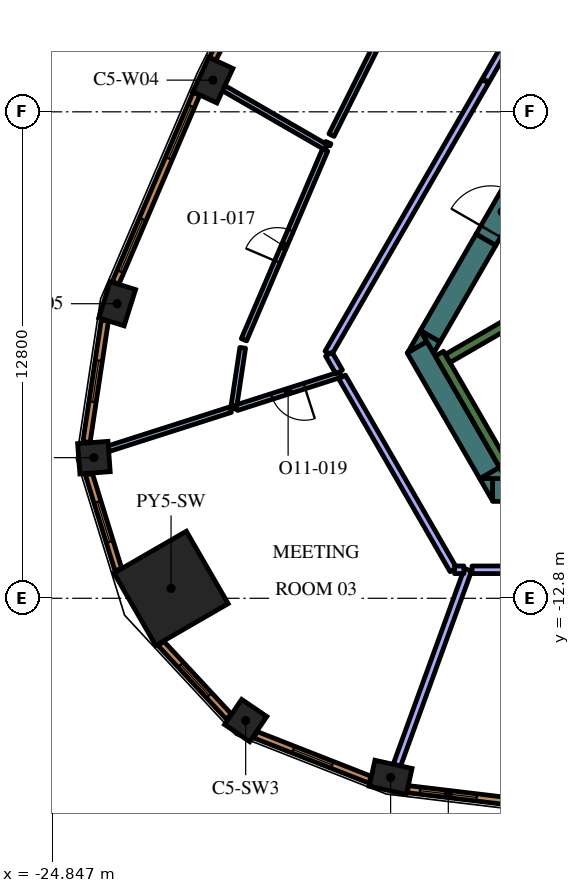
"""IFC4 building model, lengths in metres.
Left out: names, types, materials, properties, quantities, classifications, styles, units other than length and angle.
Written with IfcOpenShell. Run it as: python <this file> out.ifc"""

import sys

from ifc_helpers import new_model, si_unit, direction, frame, frame_2d, origin, origin_2d, place, context, subcontext, project, spatial, polyline, rectangle, outline, extrude, element, fill, save


model = new_model("IFC4")
c1 = context("Model", 3, precision=1e-05, world=origin(), true_north=direction((0.0, 1.0)))
c2 = subcontext(c1, "Body", "Model", "MODEL_VIEW")
j1 = project(units=[si_unit("LENGTHUNIT", "METRE"), si_unit("PLANEANGLEUNIT", "RADIAN")], contexts=[c1])
p1 = place(None, origin())
s1 = spatial("IfcSite", under=j1, at=p1, CompositionType="ELEMENT")
p2 = place(p1, origin())
s2 = spatial("IfcBuilding", under=s1, at=p2, CompositionType="ELEMENT")
p3 = place(p2, frame((0.0, 0.0, 271.2)))
s3 = spatial("IfcBuildingStorey", under=s2, at=p3, CompositionType="ELEMENT", Elevation=271.2)
p4 = place(p3, frame((-21.718, -12.539, 0.0), z_axis=(0.0, 0.0, 1.0), x_axis=(-0.866025403784, -0.5, 0.0)))
e1 = element("IfcColumn", 1, at=p4, inside=s3, PredefinedType="COLUMN", context=c2, shape_type="SweptSolid", body=[
    extrude(rectangle(XDim=2.2, YDim=2.2, at=origin_2d()), origin(), (0.0, 0.0, 1.0), 4.2),
])
for number, where, z_axis, x_axis in (
    (2, (-15.941, -17.512, 0.0), (0.0, 0.0, 1.0), (0.976, -0.217, 0.0)),
    (3, (-20.619, 0.834, 0.0), (0.0, 0.0, 1.0), (-0.421, -0.907, 0.0)),
    (4, (-23.136, -5.049, 0.0), (0.0, 0.0, 1.0), (-0.3, -0.954, 0.0)),
):
    element("IfcColumn", number, at=place(p3, frame(where, z_axis=z_axis, x_axis=x_axis)), inside=s3, PredefinedType="COLUMN", context=c2, shape_type="SweptSolid", body=[
        extrude(rectangle(XDim=1.0, YDim=0.7, at=origin_2d()), origin(), (0.0, 0.0, 1.0), 4.2),
    ])
for number, where, z_axis, x_axis in (
    (5, (-23.748, -9.1, 0.0), (0.0, 0.0, 1.0), (0.075, -0.997, 0.0)),
    (6, (-19.754, -16.017, 0.0), (0.0, 0.0, 1.0), (0.826, -0.563, 0.0)),
):
    element("IfcColumn", number, at=place(p3, frame(where, z_axis=z_axis, x_axis=x_axis)), inside=s3, PredefinedType="COLUMN", context=c2, shape_type="SweptSolid", body=[
        extrude(rectangle(XDim=0.8, YDim=0.8, at=origin_2d()), origin(), (0.0, 0.0, 1.0), 4.2),
    ])
p5 = place(p3, frame((8.904, -9.95, 0.0), z_axis=(0.0, 0.0, 1.0), x_axis=(-1.0, 0.0, 0.0)))
e7 = element("IfcWall", 7, at=p5, inside=s3, PredefinedType="SOLIDWALL", context=c2, shape_type="SweptSolid", body=[
    extrude(rectangle(XDim=22.161, YDim=0.6, at=frame_2d((11.081, 0.0))), origin(), (0.0, 0.0, 1.0), 4.2),
])
p6 = place(p3, origin())
e8 = element("IfcWall", 8, at=p6, inside=s3, PredefinedType="SOLIDWALL", context=c2, shape_type="SweptSolid", body=[
    extrude(outline(polyline([(-13.597, -9.65), (-13.259, -9.65), (-13.259, -10.236), (-13.597, -9.65)])), origin(), (0.0, 0.0, 1.0), 4.2),
])
p7 = place(p3, frame((-13.333, -9.506, 0.0), z_axis=(0.0, 0.0, 1.0), x_axis=(-0.500019073792, 0.866014391245, 0.0)))
e9 = element("IfcWall", 9, at=p7, inside=s3, PredefinedType="SOLIDWALL", context=c2, shape_type="SweptSolid", body=[
    extrude(rectangle(XDim=3.823, YDim=0.6, at=frame_2d((1.912, 0.0))), origin(), (0.0, 0.0, 1.0), 4.2),
])
e10 = element("IfcWall", 10, at=p6, inside=s3, PredefinedType="SOLIDWALL", context=c2, shape_type="SweptSolid", body=[
    extrude(outline(polyline([(-14.987, -6.043), (-15.493, -6.335), (-15.156, -5.75), (-14.987, -6.043)])), origin(), (0.0, 0.0, 1.0), 4.2),
])
e11 = element("IfcWall", 11, at=p6, inside=s3, PredefinedType="SOLIDWALL", context=c2, shape_type="SweptSolid", body=[
    extrude(outline(polyline([(-12.904, -9.65), (-13.58, -9.65), (-13.073, -9.357), (-12.904, -9.65)])), origin(), (0.0, 0.0, 1.0), 4.2),
])
p8 = place(p3, frame((-13.432, -3.364, 0.0), z_axis=(0.0, 0.0, 1.0), x_axis=(-0.499960127962, -0.866048422692, 0.0)))
e12 = element("IfcWall", 12, at=p8, inside=s3, PredefinedType="SOLIDWALL", context=c2, shape_type="SweptSolid", body=[
    extrude(rectangle(XDim=2.934, YDim=0.6, at=frame_2d((1.467, 0.0))), origin(), (0.0, 0.0, 1.0), 4.2),
])
e13 = element("IfcWall", 13, at=p6, inside=s3, PredefinedType="SOLIDWALL", context=c2, shape_type="SweptSolid", body=[
    extrude(outline(polyline([(-14.809, -6.35), (-15.147, -5.764), (-14.64, -6.057), (-14.809, -6.35)])), origin(), (0.0, 0.0, 1.0), 4.2),
])
p9 = place(p3, frame((-12.84, -9.511, 0.0), z_axis=(0.0, 0.0, 1.0), x_axis=(-0.499997733992, 0.866026712061, 0.0)))
e14 = element("IfcWall", 14, at=p9, inside=s3, PredefinedType="SOLIDWALL", context=c2, shape_type="SweptSolid", body=[
    extrude(rectangle(XDim=3.634, YDim=0.25, at=frame_2d((1.817, 0.0))), origin(), (0.0, 0.0, 1.0), 4.2),
])
p10 = place(p3, frame((-14.44, -6.49, 0.0), z_axis=(0.0, 0.0, 1.0), x_axis=(0.866022966069, 0.500004222222, 0.0)))
e15 = element("IfcWall", 15, at=p10, inside=s3, PredefinedType="SOLIDWALL", context=c2, shape_type="SweptSolid", body=[
    extrude(rectangle(XDim=6.8, YDim=0.25, at=frame_2d((3.4, 0.0))), origin(), (0.0, 0.0, 1.0), 4.2),
])
p11 = place(p3, frame((-13.432, -3.364, 0.0), z_axis=(0.0, 0.0, 1.0), x_axis=(0.500000056704, 0.866025371046, 0.0)))
e16 = element("IfcWall", 16, at=p11, inside=s3, PredefinedType="SOLIDWALL", context=c2, shape_type="SweptSolid", body=[
    extrude(rectangle(XDim=1.7, YDim=0.6, at=frame_2d((0.85, 0.0))), origin(), (0.0, 0.0, 1.0), 4.2),
])
p12 = place(p11, frame((0.25, 0.0, 0.0)))
e17 = element("IfcOpeningElement", 17, at=p12, cuts=e16, PredefinedType="OPENING", context=c2, shape_type="SweptSolid", body=[
    extrude(rectangle(XDim=1.2, YDim=2.1, at=frame_2d((0.6, 1.05))), frame((0.0, 0.31, 0.0), z_axis=(0.0, -1.0, 0.0), x_axis=(1.0, 0.0, 0.0)), (0.0, 0.0, 1.0), 0.62),
])
p13 = place(p3, frame((-15.774, -17.19, 0.0), z_axis=(0.0, 0.0, 1.0), x_axis=(0.341821907823, 0.93976474893, 0.0)))
e18 = element("IfcWall", 18, at=p13, inside=s3, PredefinedType="PARTITIONING", context=c2, shape_type="SweptSolid", body=[
    extrude(rectangle(XDim=5.469, YDim=0.2, at=frame_2d((2.735, 0.0))), origin(), (0.0, 0.0, 1.0), 3.55),
])
p14 = place(p3, frame((-13.799, -12.05, 0.0), z_axis=(0.0, 0.0, 1.0), x_axis=(1.0, 0.0, 0.0)))
e19 = element("IfcWall", 19, at=p14, inside=s3, PredefinedType="PARTITIONING", context=c2, shape_type="SweptSolid", body=[
    extrude(rectangle(XDim=7.769, YDim=0.2, at=frame_2d((3.884, 0.0))), origin(), (0.0, 0.0, 1.0), 3.55),
])
p15 = place(p3, frame((-17.635, -0.936, 0.0), z_axis=(0.0, 0.0, 1.0), x_axis=(-0.866044607523, 0.499966736674, 0.0)))
e20 = element("IfcWall", 20, at=p15, inside=s3, PredefinedType="PARTITIONING", context=c2, shape_type="SweptSolid", body=[
    extrude(rectangle(XDim=3.115, YDim=0.15, at=frame_2d((1.557, 0.0))), origin(), (0.0, 0.0, 1.0), 3.55),
])
p16 = place(p3, frame((-17.497, -0.613, 0.0), z_axis=(0.0, 0.0, 1.0), x_axis=(0.447474899467, 0.894296491297, 0.0)))
e21 = element("IfcWall", 21, at=p16, inside=s3, PredefinedType="PARTITIONING", context=c2, shape_type="SweptSolid", body=[
    extrude(rectangle(XDim=5.979, YDim=0.15, at=frame_2d((2.99, 0.0))), origin(), (0.0, 0.0, 1.0), 3.55),
])
p17 = place(p16, frame((2.58, 0.0, 0.0)))
e22 = element("IfcOpeningElement", 22, at=p17, cuts=e21, PredefinedType="OPENING", context=c2, shape_type="SweptSolid", body=[
    extrude(rectangle(XDim=0.9, YDim=2.1, at=frame_2d((0.45, 1.05))), frame((0.0, 0.085, 0.0), z_axis=(0.0, -1.0, 0.0), x_axis=(1.0, 0.0, 0.0)), (0.0, 0.0, 1.0), 0.17),
])
p18 = place(p3, frame((-17.581, -0.81, 0.0), z_axis=(0.0, 0.0, 1.0), x_axis=(-0.390033474923, -0.92080067791, 0.0)))
e23 = element("IfcWall", 23, at=p18, inside=s3, PredefinedType="PARTITIONING", context=c2, shape_type="SweptSolid", body=[
    extrude(rectangle(XDim=0.061, YDim=0.15, at=frame_2d((0.03, 0.0))), origin(), (0.0, 0.0, 1.0), 3.55),
])
p19 = place(p3, frame((-19.8, -5.998, 0.0), z_axis=(0.0, 0.0, 1.0), x_axis=(0.39332238233, 0.919400621904, 0.0)))
e24 = element("IfcWall", 24, at=p19, inside=s3, PredefinedType="PARTITIONING", context=c2, shape_type="SweptSolid", body=[
    extrude(rectangle(XDim=5.431, YDim=0.15, at=frame_2d((2.715, 0.0))), origin(), (0.0, 0.0, 1.0), 3.55),
])
p20 = place(p19, frame((2.231, 0.0, 0.0)))
e25 = element("IfcOpeningElement", 25, at=p20, cuts=e24, PredefinedType="OPENING", context=c2, shape_type="SweptSolid", body=[
    extrude(rectangle(XDim=0.9, YDim=2.1, at=frame_2d((0.45, 1.05))), frame((0.0, 0.085, 0.0), z_axis=(0.0, -1.0, 0.0), x_axis=(1.0, 0.0, 0.0)), (0.0, 0.0, 1.0), 0.17),
])
p21 = place(p3, frame((-19.833, -6.21, 0.0), z_axis=(0.0, 0.0, 1.0), x_axis=(-0.149305499664, -0.988791114326, 0.0)))
e26 = element("IfcWall", 26, at=p21, inside=s3, PredefinedType="PARTITIONING", context=c2, shape_type="SweptSolid", body=[
    extrude(rectangle(XDim=1.62, YDim=0.15, at=frame_2d((0.81, 0.0))), origin(), (0.0, 0.0, 1.0), 3.55),
])
p22 = place(p3, frame((-20.154, -7.838, 0.0), z_axis=(0.0, 0.0, 1.0), x_axis=(-0.952501497002, -0.304533903217, 0.0)))
e27 = element("IfcWall", 27, at=p22, inside=s3, PredefinedType="PARTITIONING", context=c2, shape_type="SweptSolid", body=[
    extrude(rectangle(XDim=3.37, YDim=0.15, at=frame_2d((1.685, 0.0))), origin(), (0.0, 0.0, 1.0), 3.55),
])
p23 = place(p3, frame((-17.256, -6.911, 0.0), z_axis=(0.0, 0.0, 1.0), x_axis=(-0.95247639241, -0.304612412587, 0.0)))
e28 = element("IfcWall", 28, at=p23, inside=s3, PredefinedType="PARTITIONING", context=c2, shape_type="SweptSolid", body=[
    extrude(rectangle(XDim=2.875, YDim=0.15, at=frame_2d((1.438, 0.0))), origin(), (0.0, 0.0, 1.0), 3.55),
])
p24 = place(p23, frame((1.0, 0.0, 0.0)))
e29 = element("IfcOpeningElement", 29, at=p24, cuts=e28, PredefinedType="OPENING", context=c2, shape_type="SweptSolid", body=[
    extrude(rectangle(XDim=0.9, YDim=2.1, at=frame_2d((0.45, 1.05))), frame((0.0, 0.085, 0.0), z_axis=(0.0, -1.0, 0.0), x_axis=(1.0, 0.0, 0.0)), (0.0, 0.0, 1.0), 0.17),
])
p25 = place(p3, frame((-7.436, 11.221, 0.0), z_axis=(0.0, 0.0, 1.0), x_axis=(-0.49999894854, -0.866026010844, 0.0)))
e30 = element("IfcWall", 30, at=p25, inside=s3, PredefinedType="PARTITIONING", context=c2, shape_type="SweptSolid", body=[
    extrude(rectangle(XDim=12.0, YDim=0.2, at=frame_2d((6.0, 0.0))), origin(), (0.0, 0.0, 1.0), 3.55),
])
p26 = place(p25, frame((5.5, 0.0, 0.0)))
e31 = element("IfcOpeningElement", 31, at=p26, cuts=e30, PredefinedType="OPENING", context=c2, shape_type="SweptSolid", body=[
    extrude(rectangle(XDim=1.0, YDim=2.1, at=frame_2d((0.5, 1.05))), frame((0.0, 0.11, 0.0), z_axis=(0.0, -1.0, 0.0), x_axis=(1.0, 0.0, 0.0)), (0.0, 0.0, 1.0), 0.22),
])
p27 = place(p3, frame((-13.451, 0.803, 0.0), z_axis=(0.0, 0.0, 1.0), x_axis=(-0.499982585408, -0.86603545787, 0.0)))
e32 = element("IfcWall", 32, at=p27, inside=s3, PredefinedType="PARTITIONING", context=c2, shape_type="SweptSolid", body=[
    extrude(rectangle(XDim=8.26, YDim=0.2, at=frame_2d((4.13, 0.0))), origin(), (0.0, 0.0, 1.0), 3.55),
])
p28 = place(p3, frame((-17.565, -6.376, 0.0), z_axis=(0.0, 0.0, 1.0), x_axis=(0.499683376352, -0.866208129376, 0.0)))
e33 = element("IfcWall", 33, at=p28, inside=s3, PredefinedType="PARTITIONING", context=c2, shape_type="SweptSolid", body=[
    extrude(rectangle(XDim=0.541, YDim=0.2, at=frame_2d((0.271, 0.0))), origin(), (0.0, 0.0, 1.0), 3.55),
])
p29 = place(p3, frame((-17.218, -6.978, 0.0), z_axis=(0.0, 0.0, 1.0), x_axis=(0.500012299885, -0.866018302326, 0.0)))
e34 = element("IfcWall", 34, at=p29, inside=s3, PredefinedType="PARTITIONING", context=c2, shape_type="SweptSolid", body=[
    extrude(rectangle(XDim=5.857, YDim=0.2, at=frame_2d((2.929, 0.0))), origin(), (0.0, 0.0, 1.0), 3.55),
])
p30 = place(p3, frame((-14.26, -12.05, 0.0), z_axis=(0.0, 0.0, 1.0), x_axis=(1.0, 0.0, 0.0)))
e35 = element("IfcWall", 35, at=p30, inside=s3, PredefinedType="PARTITIONING", context=c2, shape_type="SweptSolid", body=[
    extrude(rectangle(XDim=0.248, YDim=0.2, at=frame_2d((0.124, 0.0))), origin(), (0.0, 0.0, 1.0), 3.55),
])
p31 = place(p3, frame((-15.487, -17.823, 0.0), z_axis=(0.0, 0.0, 1.0), x_axis=(0.992885582795, -0.119072328769, 0.0)))
e36 = element("IfcWall", 36, at=p31, inside=s3, PredefinedType="SOLIDWALL", context=c2, shape_type="SweptSolid", body=[
    extrude(rectangle(XDim=5.415, YDim=0.19, at=frame_2d((2.708, 0.0))), origin(), (0.0, 0.0, 1.0), 3.95),
])
p32 = place(p31, frame((0.323, 0.0, 0.6)))
e37 = element("IfcOpeningElement", 37, at=p32, cuts=e36, PredefinedType="OPENING", context=c2, shape_type="SweptSolid", body=[
    extrude(rectangle(XDim=1.5, YDim=2.85, at=frame_2d((0.75, 1.425))), frame((0.0, 0.105, 0.0), z_axis=(0.0, -1.0, 0.0), x_axis=(1.0, 0.0, 0.0)), (0.0, 0.0, 1.0), 0.21),
])
p33 = place(p31, frame((3.558, 0.0, 0.6)))
e38 = element("IfcOpeningElement", 38, at=p33, cuts=e36, PredefinedType="OPENING", context=c2, shape_type="SweptSolid", body=[
    extrude(rectangle(XDim=1.5, YDim=2.85, at=frame_2d((0.75, 1.425))), frame((0.0, 0.105, 0.0), z_axis=(0.0, -1.0, 0.0), x_axis=(1.0, 0.0, 0.0)), (0.0, 0.0, 1.0), 0.21),
])
p34 = place(p3, frame((-18.206, 6.227, 0.0), z_axis=(0.0, 0.0, 1.0), x_axis=(-0.447484531401, -0.894291671747, 0.0)))
e39 = element("IfcWall", 39, at=p34, inside=s3, PredefinedType="SOLIDWALL", context=c2, shape_type="SweptSolid", body=[
    extrude(rectangle(XDim=5.406, YDim=0.19, at=frame_2d((2.703, 0.0))), origin(), (0.0, 0.0, 1.0), 3.95),
])
p35 = place(p34, frame((0.346, 0.0, 0.6)))
e40 = element("IfcOpeningElement", 40, at=p35, cuts=e39, PredefinedType="OPENING", context=c2, shape_type="SweptSolid", body=[
    extrude(rectangle(XDim=1.5, YDim=2.85, at=frame_2d((0.75, 1.425))), frame((0.0, 0.105, 0.0), z_axis=(0.0, -1.0, 0.0), x_axis=(1.0, 0.0, 0.0)), (0.0, 0.0, 1.0), 0.21),
])
p36 = place(p34, frame((3.559, 0.0, 0.6)))
e41 = element("IfcOpeningElement", 41, at=p36, cuts=e39, PredefinedType="OPENING", context=c2, shape_type="SweptSolid", body=[
    extrude(rectangle(XDim=1.5, YDim=2.85, at=frame_2d((0.75, 1.425))), frame((0.0, 0.105, 0.0), z_axis=(0.0, -1.0, 0.0), x_axis=(1.0, 0.0, 0.0)), (0.0, 0.0, 1.0), 0.21),
])
p37 = place(p3, frame((-21.049, 0.478, 0.0), z_axis=(0.0, 0.0, 1.0), x_axis=(-0.393347848476, -0.919389726992, 0.0)))
e42 = element("IfcWall", 42, at=p37, inside=s3, PredefinedType="SOLIDWALL", context=c2, shape_type="SweptSolid", body=[
    extrude(rectangle(XDim=5.415, YDim=0.19, at=frame_2d((2.708, 0.0))), origin(), (0.0, 0.0, 1.0), 3.95),
])
p38 = place(p37, frame((0.357, 0.0, 0.6)))
e43 = element("IfcOpeningElement", 43, at=p38, cuts=e42, PredefinedType="OPENING", context=c2, shape_type="SweptSolid", body=[
    extrude(rectangle(XDim=1.5, YDim=2.85, at=frame_2d((0.75, 1.425))), frame((0.0, 0.105, 0.0), z_axis=(0.0, -1.0, 0.0), x_axis=(1.0, 0.0, 0.0)), (0.0, 0.0, 1.0), 0.21),
])
p39 = place(p37, frame((3.593, 0.0, 0.6)))
e44 = element("IfcOpeningElement", 44, at=p39, cuts=e42, PredefinedType="OPENING", context=c2, shape_type="SweptSolid", body=[
    extrude(rectangle(XDim=1.5, YDim=2.85, at=frame_2d((0.75, 1.425))), frame((0.0, 0.105, 0.0), z_axis=(0.0, -1.0, 0.0), x_axis=(1.0, 0.0, 0.0)), (0.0, 0.0, 1.0), 0.21),
])
p40 = place(p3, frame((-23.46, -5.488, 0.0), z_axis=(0.0, 0.0, 1.0), x_axis=(-0.149421055602, -0.988773658702, 0.0)))
e45 = element("IfcWall", 45, at=p40, inside=s3, PredefinedType="SOLIDWALL", context=c2, shape_type="SweptSolid", body=[
    extrude(rectangle(XDim=3.237, YDim=0.19, at=frame_2d((1.618, 0.0))), origin(), (0.0, 0.0, 1.0), 3.95),
])
p41 = place(p40, frame((1.068, 0.0, 0.6)))
e46 = element("IfcOpeningElement", 46, at=p41, cuts=e45, PredefinedType="OPENING", context=c2, shape_type="SweptSolid", body=[
    extrude(rectangle(XDim=1.1, YDim=2.85, at=frame_2d((0.55, 1.425))), frame((0.0, 0.105, 0.0), z_axis=(0.0, -1.0, 0.0), x_axis=(1.0, 0.0, 0.0)), (0.0, 0.0, 1.0), 0.21),
])
p42 = place(p3, frame((-23.881, -9.535, 0.0), z_axis=(0.0, 0.0, 1.0), x_axis=(0.294706210429, -0.9555879078, 0.0)))
e47 = element("IfcWall", 47, at=p42, inside=s3, PredefinedType="SOLIDWALL", context=c2, shape_type="SweptSolid", body=[
    extrude(rectangle(XDim=2.627, YDim=0.19, at=frame_2d((1.313, 0.0))), origin(), (0.0, 0.0, 1.0), 3.95),
])
p43 = place(p42, frame((0.763, 0.0, 0.6)))
e48 = element("IfcOpeningElement", 48, at=p43, cuts=e47, PredefinedType="OPENING", context=c2, shape_type="SweptSolid", body=[
    extrude(rectangle(XDim=1.1, YDim=2.85, at=frame_2d((0.55, 1.425))), frame((0.0, 0.105, 0.0), z_axis=(0.0, -1.0, 0.0), x_axis=(1.0, 0.0, 0.0)), (0.0, 0.0, 1.0), 0.21),
])
p44 = place(p3, frame((-21.985, -13.988, 0.0), z_axis=(0.0, 0.0, 1.0), x_axis=(0.680219354823, -0.733008614768, 0.0)))
e49 = element("IfcWall", 49, at=p44, inside=s3, PredefinedType="SOLIDWALL", context=c2, shape_type="SweptSolid", body=[
    extrude(rectangle(XDim=2.627, YDim=0.19, at=frame_2d((1.313, 0.0))), origin(), (0.0, 0.0, 1.0), 3.95),
])
p45 = place(p44, frame((0.763, 0.0, 0.6)))
e50 = element("IfcOpeningElement", 50, at=p45, cuts=e49, PredefinedType="OPENING", context=c2, shape_type="SweptSolid", body=[
    extrude(rectangle(XDim=1.1, YDim=2.85, at=frame_2d((0.55, 1.425))), frame((0.0, 0.105, 0.0), z_axis=(0.0, -1.0, 0.0), x_axis=(1.0, 0.0, 0.0)), (0.0, 0.0, 1.0), 0.21),
])
p46 = place(p3, frame((-19.496, -16.392, 0.0), z_axis=(0.0, 0.0, 1.0), x_axis=(0.93100888477, -0.364996515709, 0.0)))
e51 = element("IfcWall", 51, at=p46, inside=s3, PredefinedType="SOLIDWALL", context=c2, shape_type="SweptSolid", body=[
    extrude(rectangle(XDim=3.237, YDim=0.19, at=frame_2d((1.618, 0.0))), origin(), (0.0, 0.0, 1.0), 3.95),
])
p47 = place(p46, frame((1.068, 0.0, 0.6)))
e52 = element("IfcOpeningElement", 52, at=p47, cuts=e51, PredefinedType="OPENING", context=c2, shape_type="SweptSolid", body=[
    extrude(rectangle(XDim=1.1, YDim=2.85, at=frame_2d((0.55, 1.425))), frame((0.0, 0.105, 0.0), z_axis=(0.0, -1.0, 0.0), x_axis=(1.0, 0.0, 0.0)), (0.0, 0.0, 1.0), 0.21),
])
p48 = place(p12, origin())
e53 = element("IfcDoor", 53, at=p48, inside=s3, OperationType="SINGLE_SWING_LEFT", PredefinedType="DOOR", context=c2, shape_type="SweptSolid", body=[
    extrude(rectangle(XDim=1.2, YDim=2.1, at=frame_2d((0.6, 1.05))), frame((0.0, 0.025, 0.0), z_axis=(0.0, -1.0, 0.0), x_axis=(1.0, 0.0, 0.0)), (0.0, 0.0, 1.0), 0.05),
])
fill(e17, e53)
p49 = place(p20, origin())
e54 = element("IfcDoor", 54, at=p49, inside=s3, OperationType="SINGLE_SWING_LEFT", PredefinedType="DOOR", context=c2, shape_type="SweptSolid", body=[
    extrude(rectangle(XDim=0.9, YDim=2.1, at=frame_2d((0.45, 1.05))), frame((0.0, 0.025, 0.0), z_axis=(0.0, -1.0, 0.0), x_axis=(1.0, 0.0, 0.0)), (0.0, 0.0, 1.0), 0.05),
])
fill(e25, e54)
p50 = place(p24, origin())
e55 = element("IfcDoor", 55, at=p50, inside=s3, OperationType="SINGLE_SWING_RIGHT", PredefinedType="DOOR", context=c2, shape_type="SweptSolid", body=[
    extrude(rectangle(XDim=0.9, YDim=2.1, at=frame_2d((0.45, 1.05))), frame((0.0, 0.025, 0.0), z_axis=(0.0, -1.0, 0.0), x_axis=(1.0, 0.0, 0.0)), (0.0, 0.0, 1.0), 0.05),
])
fill(e29, e55)
p51 = place(p32, origin())
e56 = element("IfcWindow", 56, at=p51, inside=s3, PartitioningType="SINGLE_PANEL", PredefinedType="WINDOW", context=c2, shape_type="SweptSolid", body=[
    extrude(rectangle(XDim=1.5, YDim=2.85, at=frame_2d((0.75, 1.425))), frame((0.0, 0.045, 0.0), z_axis=(0.0, -1.0, 0.0), x_axis=(1.0, 0.0, 0.0)), (0.0, 0.0, 1.0), 0.06),
])
fill(e37, e56)
p52 = place(p38, origin())
e57 = element("IfcWindow", 57, at=p52, inside=s3, PartitioningType="SINGLE_PANEL", PredefinedType="WINDOW", context=c2, shape_type="SweptSolid", body=[
    extrude(rectangle(XDim=1.5, YDim=2.85, at=frame_2d((0.75, 1.425))), frame((0.0, 0.045, 0.0), z_axis=(0.0, -1.0, 0.0), x_axis=(1.0, 0.0, 0.0)), (0.0, 0.0, 1.0), 0.06),
])
fill(e43, e57)
p53 = place(p39, origin())
e58 = element("IfcWindow", 58, at=p53, inside=s3, PartitioningType="SINGLE_PANEL", PredefinedType="WINDOW", context=c2, shape_type="SweptSolid", body=[
    extrude(rectangle(XDim=1.5, YDim=2.85, at=frame_2d((0.75, 1.425))), frame((0.0, 0.045, 0.0), z_axis=(0.0, -1.0, 0.0), x_axis=(1.0, 0.0, 0.0)), (0.0, 0.0, 1.0), 0.06),
])
fill(e44, e58)
p54 = place(p41, origin())
e59 = element("IfcWindow", 59, at=p54, inside=s3, PartitioningType="SINGLE_PANEL", PredefinedType="WINDOW", context=c2, shape_type="SweptSolid", body=[
    extrude(rectangle(XDim=1.1, YDim=2.85, at=frame_2d((0.55, 1.425))), frame((0.0, 0.045, 0.0), z_axis=(0.0, -1.0, 0.0), x_axis=(1.0, 0.0, 0.0)), (0.0, 0.0, 1.0), 0.06),
])
fill(e46, e59)
p55 = place(p43, origin())
e60 = element("IfcWindow", 60, at=p55, inside=s3, PartitioningType="SINGLE_PANEL", PredefinedType="WINDOW", context=c2, shape_type="SweptSolid", body=[
    extrude(rectangle(XDim=1.1, YDim=2.85, at=frame_2d((0.55, 1.425))), frame((0.0, 0.045, 0.0), z_axis=(0.0, -1.0, 0.0), x_axis=(1.0, 0.0, 0.0)), (0.0, 0.0, 1.0), 0.06),
])
fill(e48, e60)
p56 = place(p45, origin())
e61 = element("IfcWindow", 61, at=p56, inside=s3, PartitioningType="SINGLE_PANEL", PredefinedType="WINDOW", context=c2, shape_type="SweptSolid", body=[
    extrude(rectangle(XDim=1.1, YDim=2.85, at=frame_2d((0.55, 1.425))), frame((0.0, 0.045, 0.0), z_axis=(0.0, -1.0, 0.0), x_axis=(1.0, 0.0, 0.0)), (0.0, 0.0, 1.0), 0.06),
])
fill(e50, e61)
p57 = place(p47, origin())
e62 = element("IfcWindow", 62, at=p57, inside=s3, PartitioningType="SINGLE_PANEL", PredefinedType="WINDOW", context=c2, shape_type="SweptSolid", body=[
    extrude(rectangle(XDim=1.1, YDim=2.85, at=frame_2d((0.55, 1.425))), frame((0.0, 0.045, 0.0), z_axis=(0.0, -1.0, 0.0), x_axis=(1.0, 0.0, 0.0)), (0.0, 0.0, 1.0), 0.06),
])
fill(e52, e62)
save(model, sys.argv[1])
